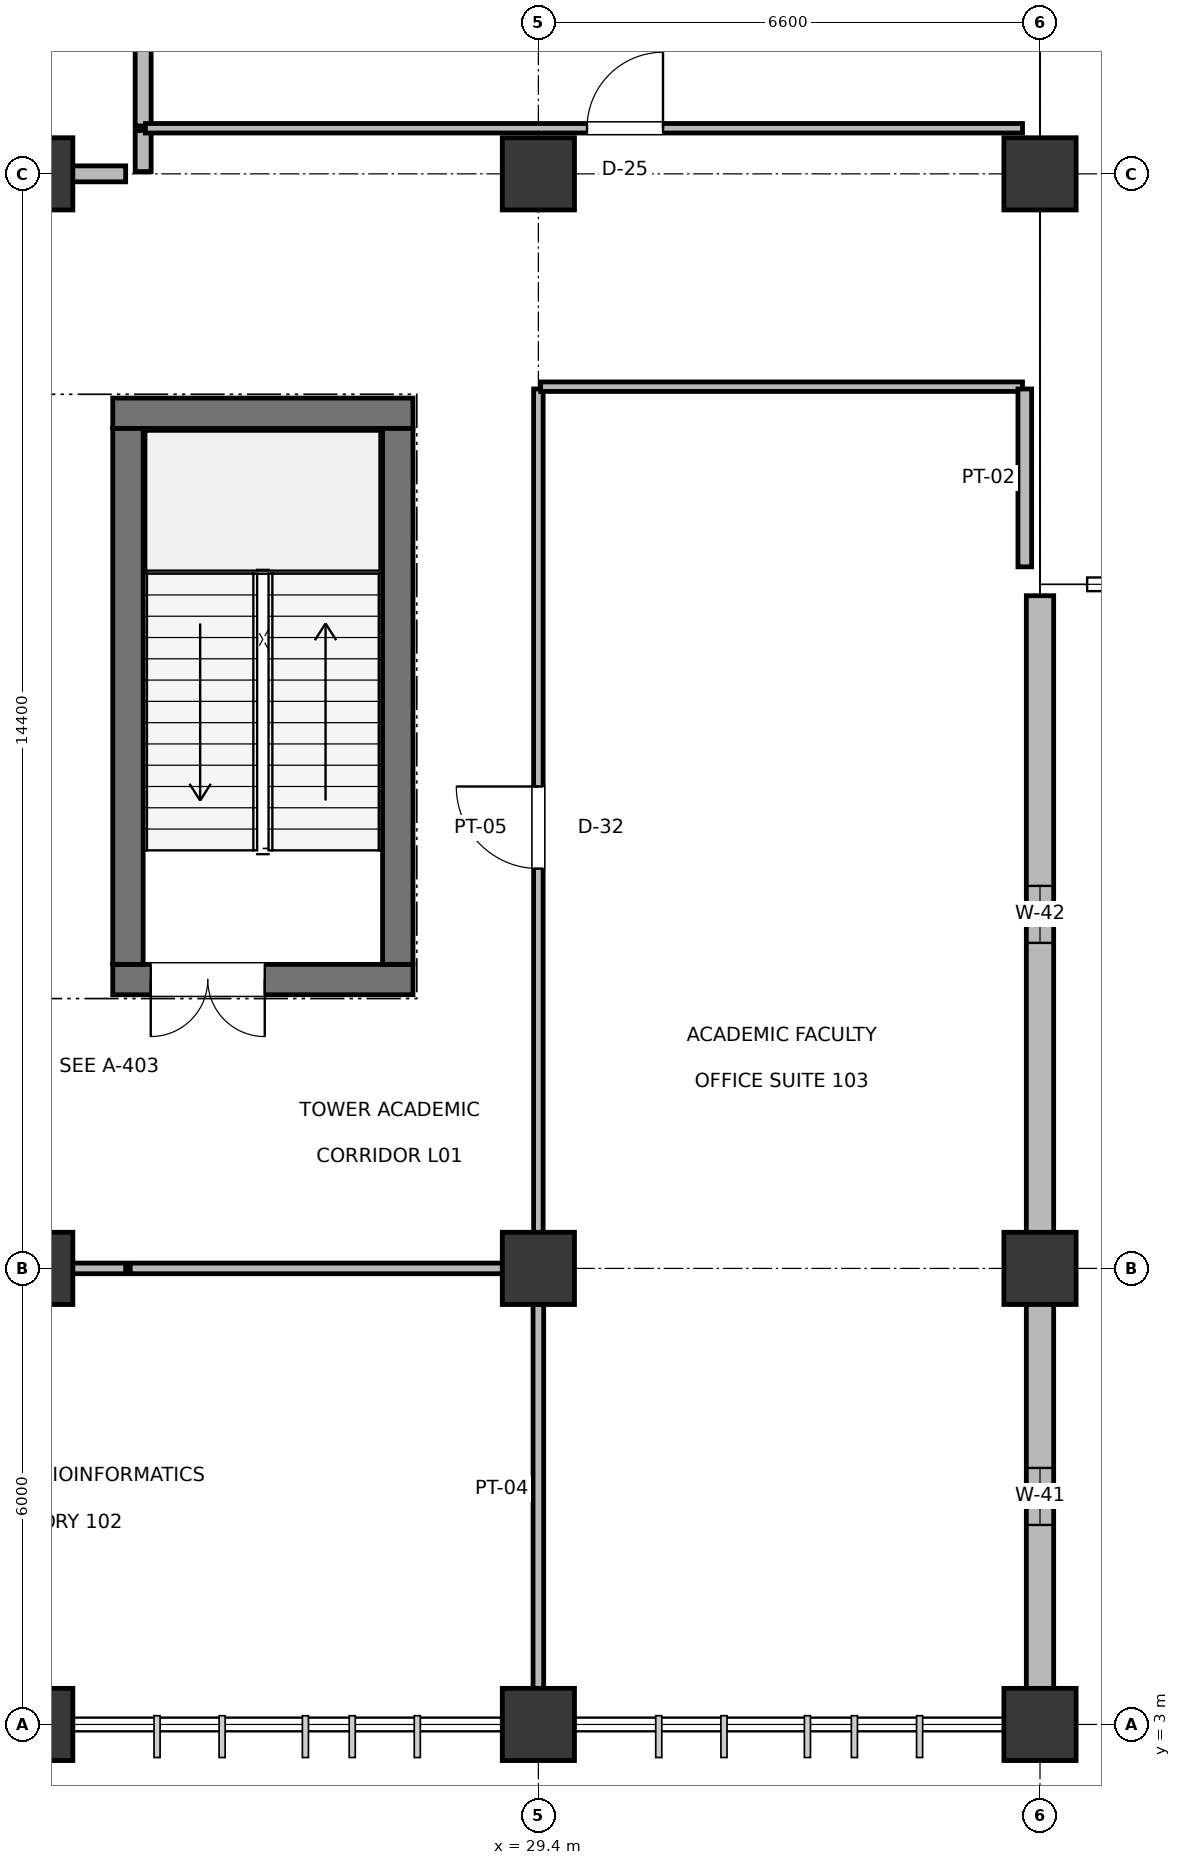
"""IFC4 building model, lengths in metres.
Left out: names, types, materials, properties, quantities, classifications, styles, units other than length and angle.
Written with IfcOpenShell. Run it as: python <this file> out.ifc"""

import sys

from ifc_helpers import new_model, si_unit, direction, frame, frame_2d, origin, origin_2d, place, context, subcontext, project, spatial, rectangle, extrude, element, fill, save


model = new_model("IFC4")
c1 = context("Model", 3, precision=1e-05, world=origin(), true_north=direction((0.0, 1.0)))
c2 = subcontext(c1, "Body", "Model", "MODEL_VIEW")
j1 = project(units=[si_unit("LENGTHUNIT", "METRE"), si_unit("PLANEANGLEUNIT", "RADIAN")], contexts=[c1])
p1 = place(None, origin())
s1 = spatial("IfcSite", under=j1, at=p1, CompositionType="ELEMENT")
p2 = place(p1, origin())
s2 = spatial("IfcBuilding", under=s1, at=p2, CompositionType="ELEMENT")
p3 = place(p2, frame((0.0, 0.0, 5.4)))
s3 = spatial("IfcBuildingStorey", under=s2, at=p3, CompositionType="ELEMENT", Elevation=5.4)
for number, where, z_axis, x_axis in (
    (1, (22.8, 3.0, 0.0), (0.0, 0.0, 1.0), (1.0, 0.0, 0.0)),
    (2, (22.8, 9.0, 0.0), (0.0, 0.0, 1.0), (1.0, 0.0, 0.0)),
    (3, (22.8, 23.4, 0.0), (0.0, 0.0, 1.0), (1.0, 0.0, 0.0)),
    (4, (29.4, 3.0, 0.0), (0.0, 0.0, 1.0), (1.0, 0.0, 0.0)),
    (5, (29.4, 9.0, 0.0), (0.0, 0.0, 1.0), (1.0, 0.0, 0.0)),
    (6, (29.4, 23.4, 0.0), (0.0, 0.0, 1.0), (1.0, 0.0, 0.0)),
    (7, (36.0, 3.0, 0.0), (0.0, 0.0, 1.0), (1.0, 0.0, 0.0)),
    (8, (36.0, 9.0, 0.0), (0.0, 0.0, 1.0), (1.0, 0.0, 0.0)),
    (9, (36.0, 23.4, 0.0), (0.0, 0.0, 1.0), (1.0, 0.0, 0.0)),
):
    element("IfcColumn", number, at=place(p3, frame(where, z_axis=z_axis, x_axis=x_axis)), inside=s3, PredefinedType="COLUMN", context=c2, shape_type="SweptSolid", body=[
        extrude(rectangle(XDim=0.95, YDim=0.95, at=origin_2d()), origin(), (0.0, 0.0, 1.0), 4.8),
    ])
p4 = place(p3, frame((36.0, 3.465, 0.0), z_axis=(0.0, 0.0, 1.0), x_axis=(0.0, 1.0, 0.0)))
e10 = element("IfcWall", 10, at=p4, inside=s3, PredefinedType="SOLIDWALL", context=c2, shape_type="SweptSolid", body=[
    extrude(rectangle(XDim=5.07, YDim=0.36, at=frame_2d((2.535, 0.0))), origin(), (0.0, 0.0, 1.0), 3.925),
])
p5 = place(p4, frame((2.16, 0.0, 0.9)))
e11 = element("IfcOpeningElement", 11, at=p5, cuts=e10, PredefinedType="OPENING", context=c2, shape_type="SweptSolid", body=[
    extrude(rectangle(XDim=0.75, YDim=1.15, at=frame_2d((0.375, 0.575))), frame((0.0, 0.19, 0.0), z_axis=(0.0, -1.0, 0.0), x_axis=(1.0, 0.0, 0.0)), (0.0, 0.0, 1.0), 0.38),
])
p6 = place(p3, frame((36.0, 9.465, 0.0), z_axis=(0.0, 0.0, 1.0), x_axis=(0.0, 1.0, 0.0)))
e12 = element("IfcWall", 12, at=p6, inside=s3, PredefinedType="SOLIDWALL", context=c2, shape_type="SweptSolid", body=[
    extrude(rectangle(XDim=8.385, YDim=0.36, at=frame_2d((4.192, 0.0))), origin(), (0.0, 0.0, 1.0), 3.725),
])
p7 = place(p6, frame((3.817, 0.0, 0.9)))
e13 = element("IfcOpeningElement", 13, at=p7, cuts=e12, PredefinedType="OPENING", context=c2, shape_type="SweptSolid", body=[
    extrude(rectangle(XDim=0.75, YDim=1.35, at=frame_2d((0.375, 0.675))), frame((0.0, 0.19, 0.0), z_axis=(0.0, -1.0, 0.0), x_axis=(1.0, 0.0, 0.0)), (0.0, 0.0, 1.0), 0.38),
])
p8 = place(p3, frame((23.8, 12.8, 0.0), z_axis=(0.0, 0.0, 1.0), x_axis=(1.0, 0.0, 0.0)))
e14 = element("IfcWall", 14, at=p8, inside=s3, PredefinedType="SHEAR", context=c2, shape_type="SweptSolid", body=[
    extrude(rectangle(XDim=3.95, YDim=0.4, at=frame_2d((1.975, 0.0))), origin(), (0.0, 0.0, 1.0), 4.58),
])
p9 = place(p8, frame((0.5, 0.0, 0.0)))
e15 = element("IfcOpeningElement", 15, at=p9, cuts=e14, PredefinedType="OPENING", context=c2, shape_type="SweptSolid", body=[
    extrude(rectangle(XDim=1.5, YDim=2.2, at=frame_2d((0.75, 1.1))), frame((0.0, 0.21, 0.0), z_axis=(0.0, -1.0, 0.0), x_axis=(1.0, 0.0, 0.0)), (0.0, 0.0, 1.0), 0.42),
])
p10 = place(p3, frame((23.8, 20.25, 0.0), z_axis=(0.0, 0.0, 1.0), x_axis=(1.0, 0.0, 0.0)))
e16 = element("IfcWall", 16, at=p10, inside=s3, PredefinedType="SHEAR", context=c2, shape_type="SweptSolid", body=[
    extrude(rectangle(XDim=3.95, YDim=0.4, at=frame_2d((1.975, 0.0))), origin(), (0.0, 0.0, 1.0), 4.58),
])
for number, where, z_axis, x_axis in (
    (17, (24.0, 13.0, 0.0), (0.0, 0.0, 1.0), (0.0, 1.0, 0.0)),
    (18, (27.55, 13.0, 0.0), (0.0, 0.0, 1.0), (0.0, 1.0, 0.0)),
):
    element("IfcWall", number, at=place(p3, frame(where, z_axis=z_axis, x_axis=x_axis)), inside=s3, PredefinedType="SHEAR", context=c2, shape_type="SweptSolid", body=[
        extrude(rectangle(XDim=7.05, YDim=0.4, at=frame_2d((3.525, 0.0))), origin(), (0.0, 0.0, 1.0), 4.58),
    ])
p11 = place(p3, frame((29.4, 3.23, 0.0), z_axis=(0.0, 0.0, 1.0), x_axis=(0.0, 1.0, 0.0)))
e19 = element("IfcWall", 19, at=p11, inside=s3, PredefinedType="PARTITIONING", context=c2, shape_type="SweptSolid", body=[
    extrude(rectangle(XDim=5.74, YDim=0.14, at=frame_2d((2.87, 0.0))), origin(), (0.0, 0.0, 1.0), 3.925),
])
p12 = place(p3, frame((24.03, 9.0, 0.0), z_axis=(0.0, 0.0, 1.0), x_axis=(1.0, 0.0, 0.0)))
e20 = element("IfcWall", 20, at=p12, inside=s3, PredefinedType="PARTITIONING", context=c2, shape_type="SweptSolid", body=[
    extrude(rectangle(XDim=5.34, YDim=0.14, at=frame_2d((2.67, 0.0))), origin(), (0.0, 0.0, 1.0), 3.825),
])
p13 = place(p3, frame((16.23, 9.0, 0.0), z_axis=(0.0, 0.0, 1.0), x_axis=(1.0, 0.0, 0.0)))
e21 = element("IfcWall", 21, at=p13, inside=s3, PredefinedType="PARTITIONING", context=c2, shape_type="SweptSolid", body=[
    extrude(rectangle(XDim=7.74, YDim=0.14, at=frame_2d((3.87, 0.0))), origin(), (0.0, 0.0, 1.0), 3.755),
])
p14 = place(p13, frame((3.295, 0.0, 0.0)))
e22 = element("IfcOpeningElement", 22, at=p14, cuts=e21, PredefinedType="OPENING", context=c2, shape_type="SweptSolid", body=[
    extrude(rectangle(XDim=1.15, YDim=2.15, at=frame_2d((0.575, 1.075))), frame((0.0, 0.08, 0.0), z_axis=(0.0, -1.0, 0.0), x_axis=(1.0, 0.0, 0.0)), (0.0, 0.0, 1.0), 0.16),
])
p15 = place(p3, frame((29.4, 9.03, 0.0), z_axis=(0.0, 0.0, 1.0), x_axis=(0.0, 1.0, 0.0)))
e23 = element("IfcWall", 23, at=p15, inside=s3, PredefinedType="PARTITIONING", context=c2, shape_type="SweptSolid", body=[
    extrude(rectangle(XDim=11.54, YDim=0.125, at=frame_2d((5.77, 0.0))), origin(), (0.0, 0.0, 1.0), 3.725),
])
p16 = place(p15, frame((5.23, 0.0, 0.0)))
e24 = element("IfcOpeningElement", 24, at=p16, cuts=e23, PredefinedType="OPENING", context=c2, shape_type="SweptSolid", body=[
    extrude(rectangle(XDim=1.08, YDim=2.15, at=frame_2d((0.54, 1.075))), frame((0.0, 0.073, 0.0), z_axis=(0.0, -1.0, 0.0), x_axis=(1.0, 0.0, 0.0)), (0.0, 0.0, 1.0), 0.145),
])
p17 = place(p3, frame((29.43, 20.6, 0.0), z_axis=(0.0, 0.0, 1.0), x_axis=(1.0, 0.0, 0.0)))
e25 = element("IfcWall", 25, at=p17, inside=s3, PredefinedType="PARTITIONING", context=c2, shape_type="SweptSolid", body=[
    extrude(rectangle(XDim=6.34, YDim=0.125, at=frame_2d((3.17, 0.0))), origin(), (0.0, 0.0, 1.0), 3.725),
])
p18 = place(p3, frame((35.8, 18.23, 0.0), z_axis=(0.0, 0.0, 1.0), x_axis=(0.0, 1.0, 0.0)))
e26 = element("IfcWall", 26, at=p18, inside=s3, PredefinedType="PARTITIONING", context=c2, shape_type="SweptSolid", body=[
    extrude(rectangle(XDim=2.34, YDim=0.18, at=frame_2d((1.17, 0.0))), origin(), (0.0, 0.0, 1.0), 3.725),
])
p19 = place(p3, frame((24.2, 24.03, 0.0), z_axis=(0.0, 0.0, 1.0), x_axis=(0.0, 1.0, 0.0)))
e27 = element("IfcWall", 27, at=p19, inside=s3, PredefinedType="PLUMBINGWALL", context=c2, shape_type="SweptSolid", body=[
    extrude(rectangle(XDim=5.74, YDim=0.21, at=frame_2d((2.87, 0.0))), origin(), (0.0, 0.0, 1.0), 3.755),
])
p20 = place(p3, frame((24.2, 23.43, 0.0), z_axis=(0.0, 0.0, 1.0), x_axis=(0.0, 1.0, 0.0)))
e28 = element("IfcWall", 28, at=p20, inside=s3, PredefinedType="PLUMBINGWALL", context=c2, shape_type="SweptSolid", body=[
    extrude(rectangle(XDim=0.54, YDim=0.21, at=frame_2d((0.27, 0.0))), origin(), (0.0, 0.0, 1.0), 3.825),
])
p21 = place(p3, frame((17.83, 23.4, 0.0), z_axis=(0.0, 0.0, 1.0), x_axis=(1.0, 0.0, 0.0)))
e29 = element("IfcWall", 29, at=p21, inside=s3, PredefinedType="PLUMBINGWALL", context=c2, shape_type="SweptSolid", body=[
    extrude(rectangle(XDim=6.14, YDim=0.21, at=frame_2d((3.07, 0.0))), origin(), (0.0, 0.0, 1.0), 3.825),
])
p22 = place(p3, frame((24.23, 24.0, 0.0), z_axis=(0.0, 0.0, 1.0), x_axis=(1.0, 0.0, 0.0)))
e30 = element("IfcWall", 30, at=p22, inside=s3, PredefinedType="PARTITIONING", context=c2, shape_type="SweptSolid", body=[
    extrude(rectangle(XDim=11.54, YDim=0.125, at=frame_2d((5.77, 0.0))), origin(), (0.0, 0.0, 1.0), 3.905),
])
p23 = place(p22, frame((5.81, 0.0, 0.0)))
e31 = element("IfcOpeningElement", 31, at=p23, cuts=e30, PredefinedType="OPENING", context=c2, shape_type="SweptSolid", body=[
    extrude(rectangle(XDim=1.0, YDim=2.15, at=frame_2d((0.5, 1.075))), frame((0.0, 0.073, 0.0), z_axis=(0.0, -1.0, 0.0), x_axis=(1.0, 0.0, 0.0)), (0.0, 0.0, 1.0), 0.145),
])
p24 = place(p5, frame((0.75, 0.0, 0.0), z_axis=(0.0, 0.0, 1.0), x_axis=(-1.0, 0.0, 0.0)))
e32 = element("IfcWindow", 32, at=p24, inside=s3, PartitioningType="DOUBLE_PANEL_VERTICAL", PredefinedType="WINDOW", context=c2, shape_type="SweptSolid", body=[
    extrude(rectangle(XDim=0.75, YDim=1.15, at=frame_2d((0.375, 0.575))), frame((0.0, 0.03, 0.0), z_axis=(0.0, -1.0, 0.0), x_axis=(1.0, 0.0, 0.0)), (0.0, 0.0, 1.0), 0.06),
])
fill(e11, e32)
p25 = place(p7, frame((0.75, 0.0, 0.0), z_axis=(0.0, 0.0, 1.0), x_axis=(-1.0, 0.0, 0.0)))
e33 = element("IfcWindow", 33, at=p25, inside=s3, PartitioningType="DOUBLE_PANEL_VERTICAL", PredefinedType="WINDOW", context=c2, shape_type="SweptSolid", body=[
    extrude(rectangle(XDim=0.75, YDim=1.35, at=frame_2d((0.375, 0.675))), frame((0.0, 0.03, 0.0), z_axis=(0.0, -1.0, 0.0), x_axis=(1.0, 0.0, 0.0)), (0.0, 0.0, 1.0), 0.06),
])
fill(e13, e33)
p26 = place(p9, frame((1.5, 0.0, 0.0), z_axis=(0.0, 0.0, 1.0), x_axis=(-1.0, 0.0, 0.0)))
e34 = element("IfcDoor", 34, at=p26, inside=s3, OperationType="DOUBLE_DOOR_SINGLE_SWING", PredefinedType="DOOR", context=c2, shape_type="SweptSolid", body=[
    extrude(rectangle(XDim=1.5, YDim=2.2, at=frame_2d((0.75, 1.1))), frame((0.0, 0.025, 0.0), z_axis=(0.0, -1.0, 0.0), x_axis=(1.0, 0.0, 0.0)), (0.0, 0.0, 1.0), 0.05),
])
fill(e15, e34)
p27 = place(p16, origin())
e35 = element("IfcDoor", 35, at=p27, inside=s3, OperationType="SINGLE_SWING_RIGHT", PredefinedType="DOOR", context=c2, shape_type="SweptSolid", body=[
    extrude(rectangle(XDim=1.08, YDim=2.15, at=frame_2d((0.54, 1.075))), frame((0.0, 0.025, 0.0), z_axis=(0.0, -1.0, 0.0), x_axis=(1.0, 0.0, 0.0)), (0.0, 0.0, 1.0), 0.05),
])
fill(e24, e35)
p28 = place(p23, origin())
e36 = element("IfcDoor", 36, at=p28, inside=s3, OperationType="SINGLE_SWING_RIGHT", PredefinedType="DOOR", context=c2, shape_type="SweptSolid", body=[
    extrude(rectangle(XDim=1.0, YDim=2.15, at=frame_2d((0.5, 1.075))), frame((0.0, 0.025, 0.0), z_axis=(0.0, -1.0, 0.0), x_axis=(1.0, 0.0, 0.0)), (0.0, 0.0, 1.0), 0.05),
])
fill(e31, e36)
save(model, sys.argv[1])
